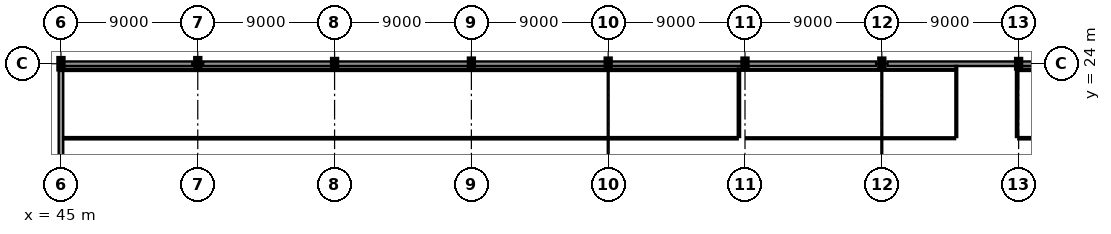
"""IFC4 building model, lengths in metres.
Left out: names, types, materials, properties, quantities, classifications, styles, units other than length and angle.
Written with IfcOpenShell. Run it as: python <this file> out.ifc"""

import sys

from ifc_helpers import new_model, si_unit, direction, frame, frame_2d, origin, origin_2d, place, context, subcontext, project, spatial, rectangle, i_section, extrude, element, fill, save


model = new_model("IFC4")
c1 = context("Model", 3, precision=1e-05, world=origin(), true_north=direction((0.0, 1.0)))
c2 = subcontext(c1, "Body", "Model", "MODEL_VIEW")
j1 = project(units=[si_unit("LENGTHUNIT", "METRE"), si_unit("PLANEANGLEUNIT", "RADIAN")], contexts=[c1])
p1 = place(None, origin())
s1 = spatial("IfcSite", under=j1, at=p1, CompositionType="ELEMENT")
p2 = place(p1, origin())
s2 = spatial("IfcBuilding", under=s1, at=p2, CompositionType="ELEMENT")
p3 = place(p2, frame((0.0, 0.0, 18.9)))
s3 = spatial("IfcBuildingStorey", under=s2, at=p3, CompositionType="ELEMENT", Elevation=18.9)
for number, where, z_axis, x_axis in (
    (1, (45.0, 24.0, 0.0), (0.0, 0.0, 1.0), (1.0, 0.0, 0.0)),
    (2, (54.0, 24.0, 0.0), (0.0, 0.0, 1.0), (0.0, 1.0, 0.0)),
):
    element("IfcColumn", number, at=place(p3, frame(where, z_axis=z_axis, x_axis=x_axis)), inside=s3, PredefinedType="COLUMN", context=c2, shape_type="SweptSolid", body=[
        extrude(i_section(OverallWidth=0.304, OverallDepth=0.716, WebThickness=0.021, FlangeThickness=0.04, at=origin_2d()), origin(), (0.0, 0.0, 1.0), 4.5),
    ])
p4 = place(p3, frame((63.0, 24.0, 0.0), z_axis=(0.0, 0.0, 1.0), x_axis=(1.0, 0.0, 0.0)))
e3 = element("IfcColumn", 3, at=p4, inside=s3, PredefinedType="COLUMN", context=c2, shape_type="SweptSolid", body=[
    extrude(i_section(OverallWidth=0.3, OverallDepth=0.6, WebThickness=0.015, FlangeThickness=0.03, at=origin_2d()), origin(), (0.0, 0.0, 1.0), 4.5),
])
for number, where, z_axis, x_axis in (
    (4, (72.0, 24.0, 0.0), (0.0, 0.0, 1.0), (1.0, 0.0, 0.0)),
    (5, (81.0, 24.0, 0.0), (0.0, 0.0, 1.0), (1.0, 0.0, 0.0)),
    (6, (90.0, 24.0, 0.0), (0.0, 0.0, 1.0), (1.0, 0.0, 0.0)),
    (7, (99.0, 24.0, 0.0), (0.0, 0.0, 1.0), (0.0, 1.0, 0.0)),
):
    element("IfcColumn", number, at=place(p3, frame(where, z_axis=z_axis, x_axis=x_axis)), inside=s3, PredefinedType="COLUMN", context=c2, shape_type="SweptSolid", body=[
        extrude(i_section(OverallWidth=0.3, OverallDepth=0.65, WebThickness=0.016, FlangeThickness=0.031, at=origin_2d()), origin(), (0.0, 0.0, 1.0), 4.5),
    ])
p5 = place(p3, frame((108.0, 24.0, 0.0), z_axis=(0.0, 0.0, 1.0), x_axis=(1.0, 0.0, 0.0)))
e8 = element("IfcColumn", 8, at=p5, inside=s3, PredefinedType="COLUMN", context=c2, shape_type="SweptSolid", body=[
    extrude(i_section(OverallWidth=0.3, OverallDepth=0.6, WebThickness=0.015, FlangeThickness=0.03, at=origin_2d()), origin(), (0.0, 0.0, 1.0), 4.5),
])
p6 = place(p3, frame((80.942, 24.0, 0.0), z_axis=(0.0, 0.0, 1.0), x_axis=(-1.0, 0.0, 0.0)))
e9 = element("IfcWall", 9, at=p6, inside=s3, PredefinedType="SOLIDWALL", context=c2, shape_type="SweptSolid", body=[
    extrude(rectangle(XDim=8.934, YDim=0.3, at=frame_2d((4.467, 0.0))), origin(), (0.0, 0.0, 1.0), 3.345),
])
p7 = place(p6, frame((1.502, 0.0, 0.85)))
e10 = element("IfcOpeningElement", 10, at=p7, cuts=e9, PredefinedType="OPENING", context=c2, shape_type="SweptSolid", body=[
    extrude(rectangle(XDim=2.0, YDim=2.0, at=frame_2d((1.0, 1.0))), frame((0.0, 0.165, 0.0), z_axis=(0.0, -1.0, 0.0), x_axis=(1.0, 0.0, 0.0)), (0.0, 0.0, 1.0), 0.33),
])
p8 = place(p6, frame((5.432, 0.0, 0.85)))
e11 = element("IfcOpeningElement", 11, at=p8, cuts=e9, PredefinedType="OPENING", context=c2, shape_type="SweptSolid", body=[
    extrude(rectangle(XDim=2.0, YDim=2.0, at=frame_2d((1.0, 1.0))), frame((0.0, 0.165, 0.0), z_axis=(0.0, -1.0, 0.0), x_axis=(1.0, 0.0, 0.0)), (0.0, 0.0, 1.0), 0.33),
])
p9 = place(p3, frame((71.992, 24.0, 0.0), z_axis=(0.0, 0.0, 1.0), x_axis=(-1.0, 0.0, 0.0)))
e12 = element("IfcWall", 12, at=p9, inside=s3, PredefinedType="SOLIDWALL", context=c2, shape_type="SweptSolid", body=[
    extrude(rectangle(XDim=8.984, YDim=0.3, at=frame_2d((4.492, 0.0))), origin(), (0.0, 0.0, 1.0), 3.345),
])
p10 = place(p9, frame((1.516, 0.0, 0.85)))
e13 = element("IfcOpeningElement", 13, at=p10, cuts=e12, PredefinedType="OPENING", context=c2, shape_type="SweptSolid", body=[
    extrude(rectangle(XDim=2.0, YDim=2.0, at=frame_2d((1.0, 1.0))), frame((0.0, 0.165, 0.0), z_axis=(0.0, -1.0, 0.0), x_axis=(1.0, 0.0, 0.0)), (0.0, 0.0, 1.0), 0.33),
])
p11 = place(p9, frame((5.468, 0.0, 0.85)))
e14 = element("IfcOpeningElement", 14, at=p11, cuts=e12, PredefinedType="OPENING", context=c2, shape_type="SweptSolid", body=[
    extrude(rectangle(XDim=2.0, YDim=2.0, at=frame_2d((1.0, 1.0))), frame((0.0, 0.165, 0.0), z_axis=(0.0, -1.0, 0.0), x_axis=(1.0, 0.0, 0.0)), (0.0, 0.0, 1.0), 0.33),
])
p12 = place(p3, frame((62.992, 24.0, 0.0), z_axis=(0.0, 0.0, 1.0), x_axis=(-1.0, 0.0, 0.0)))
e15 = element("IfcWall", 15, at=p12, inside=s3, PredefinedType="SOLIDWALL", context=c2, shape_type="SweptSolid", body=[
    extrude(rectangle(XDim=8.636, YDim=0.3, at=frame_2d((4.318, 0.0))), origin(), (0.0, 0.0, 1.0), 3.345),
])
p13 = place(p12, frame((1.418, 0.0, 0.85)))
e16 = element("IfcOpeningElement", 16, at=p13, cuts=e15, PredefinedType="OPENING", context=c2, shape_type="SweptSolid", body=[
    extrude(rectangle(XDim=2.0, YDim=2.0, at=frame_2d((1.0, 1.0))), frame((0.0, 0.165, 0.0), z_axis=(0.0, -1.0, 0.0), x_axis=(1.0, 0.0, 0.0)), (0.0, 0.0, 1.0), 0.33),
])
p14 = place(p12, frame((5.218, 0.0, 0.85)))
e17 = element("IfcOpeningElement", 17, at=p14, cuts=e15, PredefinedType="OPENING", context=c2, shape_type="SweptSolid", body=[
    extrude(rectangle(XDim=2.0, YDim=2.0, at=frame_2d((1.0, 1.0))), frame((0.0, 0.165, 0.0), z_axis=(0.0, -1.0, 0.0), x_axis=(1.0, 0.0, 0.0)), (0.0, 0.0, 1.0), 0.33),
])
p15 = place(p3, frame((53.644, 24.0, 0.0), z_axis=(0.0, 0.0, 1.0), x_axis=(-1.0, 0.0, 0.0)))
e18 = element("IfcWall", 18, at=p15, inside=s3, PredefinedType="SOLIDWALL", context=c2, shape_type="SweptSolid", body=[
    extrude(rectangle(XDim=8.636, YDim=0.3, at=frame_2d((4.318, 0.0))), origin(), (0.0, 0.0, 1.0), 3.345),
])
p16 = place(p15, frame((1.418, 0.0, 0.85)))
e19 = element("IfcOpeningElement", 19, at=p16, cuts=e18, PredefinedType="OPENING", context=c2, shape_type="SweptSolid", body=[
    extrude(rectangle(XDim=2.0, YDim=2.0, at=frame_2d((1.0, 1.0))), frame((0.0, 0.165, 0.0), z_axis=(0.0, -1.0, 0.0), x_axis=(1.0, 0.0, 0.0)), (0.0, 0.0, 1.0), 0.33),
])
p17 = place(p15, frame((5.218, 0.0, 0.85)))
e20 = element("IfcOpeningElement", 20, at=p17, cuts=e18, PredefinedType="OPENING", context=c2, shape_type="SweptSolid", body=[
    extrude(rectangle(XDim=2.0, YDim=2.0, at=frame_2d((1.0, 1.0))), frame((0.0, 0.165, 0.0), z_axis=(0.0, -1.0, 0.0), x_axis=(1.0, 0.0, 0.0)), (0.0, 0.0, 1.0), 0.33),
])
p18 = place(p3, frame((45.0, 23.644, 0.0), z_axis=(0.0, 0.0, 1.0), x_axis=(0.0, -1.0, 0.0)))
e21 = element("IfcWall", 21, at=p18, inside=s3, PredefinedType="SOLIDWALL", context=c2, shape_type="SweptSolid", body=[
    extrude(rectangle(XDim=11.336, YDim=0.3, at=frame_2d((5.668, 0.0))), origin(), (0.0, 0.0, 1.0), 3.705),
])
p19 = place(p18, frame((2.174, 0.0, 0.85)))
e22 = element("IfcOpeningElement", 22, at=p19, cuts=e21, PredefinedType="OPENING", context=c2, shape_type="SweptSolid", body=[
    extrude(rectangle(XDim=2.0, YDim=2.0, at=frame_2d((1.0, 1.0))), frame((0.0, 0.165, 0.0), z_axis=(0.0, -1.0, 0.0), x_axis=(1.0, 0.0, 0.0)), (0.0, 0.0, 1.0), 0.33),
])
p20 = place(p18, frame((5.604, 0.0, 0.85)))
e23 = element("IfcOpeningElement", 23, at=p20, cuts=e21, PredefinedType="OPENING", context=c2, shape_type="SweptSolid", body=[
    extrude(rectangle(XDim=2.0, YDim=2.0, at=frame_2d((1.0, 1.0))), frame((0.0, 0.165, 0.0), z_axis=(0.0, -1.0, 0.0), x_axis=(1.0, 0.0, 0.0)), (0.0, 0.0, 1.0), 0.33),
])
p21 = place(p3, frame((98.627, 24.0, 0.0), z_axis=(0.0, 0.0, 1.0), x_axis=(-1.0, 0.0, 0.0)))
e24 = element("IfcWall", 24, at=p21, inside=s3, PredefinedType="SOLIDWALL", context=c2, shape_type="SweptSolid", body=[
    extrude(rectangle(XDim=8.619, YDim=0.3, at=frame_2d((4.31, 0.0))), origin(), (0.0, 0.0, 1.0), 3.345),
])
p22 = place(p21, frame((1.413, 0.0, 0.85)))
e25 = element("IfcOpeningElement", 25, at=p22, cuts=e24, PredefinedType="OPENING", context=c2, shape_type="SweptSolid", body=[
    extrude(rectangle(XDim=2.0, YDim=2.0, at=frame_2d((1.0, 1.0))), frame((0.0, 0.165, 0.0), z_axis=(0.0, -1.0, 0.0), x_axis=(1.0, 0.0, 0.0)), (0.0, 0.0, 1.0), 0.33),
])
p23 = place(p21, frame((5.206, 0.0, 0.85)))
e26 = element("IfcOpeningElement", 26, at=p23, cuts=e24, PredefinedType="OPENING", context=c2, shape_type="SweptSolid", body=[
    extrude(rectangle(XDim=2.0, YDim=2.0, at=frame_2d((1.0, 1.0))), frame((0.0, 0.165, 0.0), z_axis=(0.0, -1.0, 0.0), x_axis=(1.0, 0.0, 0.0)), (0.0, 0.0, 1.0), 0.33),
])
p24 = place(p3, frame((89.992, 24.0, 0.0), z_axis=(0.0, 0.0, 1.0), x_axis=(-1.0, 0.0, 0.0)))
e27 = element("IfcWall", 27, at=p24, inside=s3, PredefinedType="SOLIDWALL", context=c2, shape_type="SweptSolid", body=[
    extrude(rectangle(XDim=8.934, YDim=0.3, at=frame_2d((4.467, 0.0))), origin(), (0.0, 0.0, 1.0), 3.345),
])
p25 = place(p24, frame((1.502, 0.0, 0.85)))
e28 = element("IfcOpeningElement", 28, at=p25, cuts=e27, PredefinedType="OPENING", context=c2, shape_type="SweptSolid", body=[
    extrude(rectangle(XDim=2.0, YDim=2.0, at=frame_2d((1.0, 1.0))), frame((0.0, 0.165, 0.0), z_axis=(0.0, -1.0, 0.0), x_axis=(1.0, 0.0, 0.0)), (0.0, 0.0, 1.0), 0.33),
])
p26 = place(p24, frame((5.432, 0.0, 0.85)))
e29 = element("IfcOpeningElement", 29, at=p26, cuts=e27, PredefinedType="OPENING", context=c2, shape_type="SweptSolid", body=[
    extrude(rectangle(XDim=2.0, YDim=2.0, at=frame_2d((1.0, 1.0))), frame((0.0, 0.165, 0.0), z_axis=(0.0, -1.0, 0.0), x_axis=(1.0, 0.0, 0.0)), (0.0, 0.0, 1.0), 0.33),
])
p27 = place(p3, frame((116.992, 24.0, 0.0), z_axis=(0.0, 0.0, 1.0), x_axis=(-1.0, 0.0, 0.0)))
e30 = element("IfcWall", 30, at=p27, inside=s3, PredefinedType="SOLIDWALL", context=c2, shape_type="SweptSolid", body=[
    extrude(rectangle(XDim=8.984, YDim=0.3, at=frame_2d((4.492, 0.0))), origin(), (0.0, 0.0, 1.0), 3.247),
])
p28 = place(p27, frame((1.516, 0.0, 0.85)))
e31 = element("IfcOpeningElement", 31, at=p28, cuts=e30, PredefinedType="OPENING", context=c2, shape_type="SweptSolid", body=[
    extrude(rectangle(XDim=2.0, YDim=2.0, at=frame_2d((1.0, 1.0))), frame((0.0, 0.165, 0.0), z_axis=(0.0, -1.0, 0.0), x_axis=(1.0, 0.0, 0.0)), (0.0, 0.0, 1.0), 0.33),
])
p29 = place(p27, frame((5.468, 0.0, 0.85)))
e32 = element("IfcOpeningElement", 32, at=p29, cuts=e30, PredefinedType="OPENING", context=c2, shape_type="SweptSolid", body=[
    extrude(rectangle(XDim=2.0, YDim=2.0, at=frame_2d((1.0, 1.0))), frame((0.0, 0.165, 0.0), z_axis=(0.0, -1.0, 0.0), x_axis=(1.0, 0.0, 0.0)), (0.0, 0.0, 1.0), 0.33),
])
p30 = place(p3, frame((107.992, 24.0, 0.0), z_axis=(0.0, 0.0, 1.0), x_axis=(-1.0, 0.0, 0.0)))
e33 = element("IfcWall", 33, at=p30, inside=s3, PredefinedType="SOLIDWALL", context=c2, shape_type="SweptSolid", body=[
    extrude(rectangle(XDim=8.619, YDim=0.3, at=frame_2d((4.31, 0.0))), origin(), (0.0, 0.0, 1.0), 3.345),
])
p31 = place(p30, frame((1.413, 0.0, 0.85)))
e34 = element("IfcOpeningElement", 34, at=p31, cuts=e33, PredefinedType="OPENING", context=c2, shape_type="SweptSolid", body=[
    extrude(rectangle(XDim=2.0, YDim=2.0, at=frame_2d((1.0, 1.0))), frame((0.0, 0.165, 0.0), z_axis=(0.0, -1.0, 0.0), x_axis=(1.0, 0.0, 0.0)), (0.0, 0.0, 1.0), 0.33),
])
p32 = place(p30, frame((5.206, 0.0, 0.85)))
e35 = element("IfcOpeningElement", 35, at=p32, cuts=e33, PredefinedType="OPENING", context=c2, shape_type="SweptSolid", body=[
    extrude(rectangle(XDim=2.0, YDim=2.0, at=frame_2d((1.0, 1.0))), frame((0.0, 0.165, 0.0), z_axis=(0.0, -1.0, 0.0), x_axis=(1.0, 0.0, 0.0)), (0.0, 0.0, 1.0), 0.33),
])
p33 = place(p3, frame((89.52, 19.1, 0.0), z_axis=(0.0, 0.0, 1.0), x_axis=(-1.0, 0.0, 0.0)))
e36 = element("IfcWall", 36, at=p33, inside=s3, PredefinedType="PARTITIONING", context=c2, shape_type="SweptSolid", body=[
    extrude(rectangle(XDim=44.375, YDim=0.15, at=frame_2d((22.188, 0.0))), origin(), (0.0, 0.0, 1.0), 4.14),
])
p34 = place(p33, frame((21.663, 0.0, 0.0)))
e37 = element("IfcOpeningElement", 37, at=p34, cuts=e36, PredefinedType="OPENING", context=c2, shape_type="SweptSolid", body=[
    extrude(rectangle(XDim=1.05, YDim=2.25, at=frame_2d((0.525, 1.125))), frame((0.0, 0.09, 0.0), z_axis=(0.0, -1.0, 0.0), x_axis=(1.0, 0.0, 0.0)), (0.0, 0.0, 1.0), 0.18),
])
p35 = place(p3, frame((45.008, 23.6, 0.0), z_axis=(0.0, 0.0, 1.0), x_axis=(1.0, 0.0, 0.0)))
e38 = element("IfcWall", 38, at=p35, inside=s3, PredefinedType="PARTITIONING", context=c2, shape_type="SweptSolid", body=[
    extrude(rectangle(XDim=44.512, YDim=0.15, at=frame_2d((22.256, 0.0))), origin(), (0.0, 0.0, 1.0), 4.14),
])
p36 = place(p3, frame((89.6, 23.677, 0.0), z_axis=(0.0, 0.0, 1.0), x_axis=(0.0, -1.0, 0.0)))
e39 = element("IfcWall", 39, at=p36, inside=s3, PredefinedType="PARTITIONING", context=c2, shape_type="SweptSolid", body=[
    extrude(rectangle(XDim=4.497, YDim=0.15, at=frame_2d((2.249, 0.0))), origin(), (0.0, 0.0, 1.0), 4.14),
])
p37 = place(p3, frame((89.608, 23.6, 0.0), z_axis=(0.0, 0.0, 1.0), x_axis=(1.0, 0.0, 0.0)))
e40 = element("IfcWall", 40, at=p37, inside=s3, PredefinedType="PARTITIONING", context=c2, shape_type="SweptSolid", body=[
    extrude(rectangle(XDim=14.212, YDim=0.12, at=frame_2d((7.106, 0.0))), origin(), (0.0, 0.0, 1.0), 4.14),
])
p38 = place(p3, frame((103.9, 23.855, 0.0), z_axis=(0.0, 0.0, 1.0), x_axis=(0.0, -1.0, 0.0)))
e41 = element("IfcWall", 41, at=p38, inside=s3, PredefinedType="PARTITIONING", context=c2, shape_type="SweptSolid", body=[
    extrude(rectangle(XDim=4.675, YDim=0.12, at=frame_2d((2.337, 0.0))), origin(), (0.0, 0.0, 1.0), 4.14),
])
p39 = place(p3, frame((103.82, 19.1, 0.0), z_axis=(0.0, 0.0, 1.0), x_axis=(-1.0, 0.0, 0.0)))
e42 = element("IfcWall", 42, at=p39, inside=s3, PredefinedType="PARTITIONING", context=c2, shape_type="SweptSolid", body=[
    extrude(rectangle(XDim=13.74, YDim=0.12, at=frame_2d((6.87, 0.0))), origin(), (0.0, 0.0, 1.0), 4.14),
])
p40 = place(p39, frame((6.395, 0.0, 0.0)))
e43 = element("IfcOpeningElement", 43, at=p40, cuts=e42, PredefinedType="OPENING", context=c2, shape_type="SweptSolid", body=[
    extrude(rectangle(XDim=0.95, YDim=2.15, at=frame_2d((0.475, 1.075))), frame((0.0, 0.075, 0.0), z_axis=(0.0, -1.0, 0.0), x_axis=(1.0, 0.0, 0.0)), (0.0, 0.0, 1.0), 0.15),
])
p41 = place(p3, frame((147.455, 19.1, 0.0), z_axis=(0.0, 0.0, 1.0), x_axis=(-1.0, 0.0, 0.0)))
e44 = element("IfcWall", 44, at=p41, inside=s3, PredefinedType="PARTITIONING", context=c2, shape_type="SweptSolid", body=[
    extrude(rectangle(XDim=39.475, YDim=0.15, at=frame_2d((19.738, 0.0))), origin(), (0.0, 0.0, 1.0), 4.14),
])
p42 = place(p41, frame((19.213, 0.0, 0.0)))
e45 = element("IfcOpeningElement", 45, at=p42, cuts=e44, PredefinedType="OPENING", context=c2, shape_type="SweptSolid", body=[
    extrude(rectangle(XDim=1.05, YDim=2.25, at=frame_2d((0.525, 1.125))), frame((0.0, 0.09, 0.0), z_axis=(0.0, -1.0, 0.0), x_axis=(1.0, 0.0, 0.0)), (0.0, 0.0, 1.0), 0.18),
])
p43 = place(p3, frame((107.9, 19.18, 0.0), z_axis=(0.0, 0.0, 1.0), x_axis=(0.0, 1.0, 0.0)))
e46 = element("IfcWall", 46, at=p43, inside=s3, PredefinedType="PARTITIONING", context=c2, shape_type="SweptSolid", body=[
    extrude(rectangle(XDim=4.522, YDim=0.15, at=frame_2d((2.261, 0.0))), origin(), (0.0, 0.0, 1.0), 3.655),
])
p44 = place(p3, frame((107.908, 23.6, 0.0), z_axis=(0.0, 0.0, 1.0), x_axis=(1.0, 0.0, 0.0)))
e47 = element("IfcWall", 47, at=p44, inside=s3, PredefinedType="PARTITIONING", context=c2, shape_type="SweptSolid", body=[
    extrude(rectangle(XDim=39.122, YDim=0.15, at=frame_2d((19.561, 0.0))), origin(), (0.0, 0.0, 1.0), 4.14),
])
p45 = place(p7, origin())
e48 = element("IfcWindow", 48, at=p45, inside=s3, PartitioningType="SINGLE_PANEL", PredefinedType="WINDOW", context=c2, shape_type="SweptSolid", body=[
    extrude(rectangle(XDim=2.0, YDim=2.0, at=frame_2d((1.0, 1.0))), frame((0.0, 0.03, 0.0), z_axis=(0.0, -1.0, 0.0), x_axis=(1.0, 0.0, 0.0)), (0.0, 0.0, 1.0), 0.06),
])
fill(e10, e48)
p46 = place(p8, origin())
e49 = element("IfcWindow", 49, at=p46, inside=s3, PartitioningType="SINGLE_PANEL", PredefinedType="WINDOW", context=c2, shape_type="SweptSolid", body=[
    extrude(rectangle(XDim=2.0, YDim=2.0, at=frame_2d((1.0, 1.0))), frame((0.0, 0.03, 0.0), z_axis=(0.0, -1.0, 0.0), x_axis=(1.0, 0.0, 0.0)), (0.0, 0.0, 1.0), 0.06),
])
fill(e11, e49)
p47 = place(p10, origin())
e50 = element("IfcWindow", 50, at=p47, inside=s3, PartitioningType="SINGLE_PANEL", PredefinedType="WINDOW", context=c2, shape_type="SweptSolid", body=[
    extrude(rectangle(XDim=2.0, YDim=2.0, at=frame_2d((1.0, 1.0))), frame((0.0, 0.03, 0.0), z_axis=(0.0, -1.0, 0.0), x_axis=(1.0, 0.0, 0.0)), (0.0, 0.0, 1.0), 0.06),
])
fill(e13, e50)
p48 = place(p11, origin())
e51 = element("IfcWindow", 51, at=p48, inside=s3, PartitioningType="SINGLE_PANEL", PredefinedType="WINDOW", context=c2, shape_type="SweptSolid", body=[
    extrude(rectangle(XDim=2.0, YDim=2.0, at=frame_2d((1.0, 1.0))), frame((0.0, 0.03, 0.0), z_axis=(0.0, -1.0, 0.0), x_axis=(1.0, 0.0, 0.0)), (0.0, 0.0, 1.0), 0.06),
])
fill(e14, e51)
p49 = place(p13, origin())
e52 = element("IfcWindow", 52, at=p49, inside=s3, PartitioningType="SINGLE_PANEL", PredefinedType="WINDOW", context=c2, shape_type="SweptSolid", body=[
    extrude(rectangle(XDim=2.0, YDim=2.0, at=frame_2d((1.0, 1.0))), frame((0.0, 0.03, 0.0), z_axis=(0.0, -1.0, 0.0), x_axis=(1.0, 0.0, 0.0)), (0.0, 0.0, 1.0), 0.06),
])
fill(e16, e52)
p50 = place(p14, origin())
e53 = element("IfcWindow", 53, at=p50, inside=s3, PartitioningType="SINGLE_PANEL", PredefinedType="WINDOW", context=c2, shape_type="SweptSolid", body=[
    extrude(rectangle(XDim=2.0, YDim=2.0, at=frame_2d((1.0, 1.0))), frame((0.0, 0.03, 0.0), z_axis=(0.0, -1.0, 0.0), x_axis=(1.0, 0.0, 0.0)), (0.0, 0.0, 1.0), 0.06),
])
fill(e17, e53)
p51 = place(p16, origin())
e54 = element("IfcWindow", 54, at=p51, inside=s3, PartitioningType="SINGLE_PANEL", PredefinedType="WINDOW", context=c2, shape_type="SweptSolid", body=[
    extrude(rectangle(XDim=2.0, YDim=2.0, at=frame_2d((1.0, 1.0))), frame((0.0, 0.03, 0.0), z_axis=(0.0, -1.0, 0.0), x_axis=(1.0, 0.0, 0.0)), (0.0, 0.0, 1.0), 0.06),
])
fill(e19, e54)
p52 = place(p17, origin())
e55 = element("IfcWindow", 55, at=p52, inside=s3, PartitioningType="SINGLE_PANEL", PredefinedType="WINDOW", context=c2, shape_type="SweptSolid", body=[
    extrude(rectangle(XDim=2.0, YDim=2.0, at=frame_2d((1.0, 1.0))), frame((0.0, 0.03, 0.0), z_axis=(0.0, -1.0, 0.0), x_axis=(1.0, 0.0, 0.0)), (0.0, 0.0, 1.0), 0.06),
])
fill(e20, e55)
p53 = place(p19, origin())
e56 = element("IfcWindow", 56, at=p53, inside=s3, PartitioningType="SINGLE_PANEL", PredefinedType="WINDOW", context=c2, shape_type="SweptSolid", body=[
    extrude(rectangle(XDim=2.0, YDim=2.0, at=frame_2d((1.0, 1.0))), frame((0.0, 0.03, 0.0), z_axis=(0.0, -1.0, 0.0), x_axis=(1.0, 0.0, 0.0)), (0.0, 0.0, 1.0), 0.06),
])
fill(e22, e56)
p54 = place(p22, origin())
e57 = element("IfcWindow", 57, at=p54, inside=s3, PartitioningType="SINGLE_PANEL", PredefinedType="WINDOW", context=c2, shape_type="SweptSolid", body=[
    extrude(rectangle(XDim=2.0, YDim=2.0, at=frame_2d((1.0, 1.0))), frame((0.0, 0.03, 0.0), z_axis=(0.0, -1.0, 0.0), x_axis=(1.0, 0.0, 0.0)), (0.0, 0.0, 1.0), 0.06),
])
fill(e25, e57)
p55 = place(p23, origin())
e58 = element("IfcWindow", 58, at=p55, inside=s3, PartitioningType="SINGLE_PANEL", PredefinedType="WINDOW", context=c2, shape_type="SweptSolid", body=[
    extrude(rectangle(XDim=2.0, YDim=2.0, at=frame_2d((1.0, 1.0))), frame((0.0, 0.03, 0.0), z_axis=(0.0, -1.0, 0.0), x_axis=(1.0, 0.0, 0.0)), (0.0, 0.0, 1.0), 0.06),
])
fill(e26, e58)
p56 = place(p25, origin())
e59 = element("IfcWindow", 59, at=p56, inside=s3, PartitioningType="SINGLE_PANEL", PredefinedType="WINDOW", context=c2, shape_type="SweptSolid", body=[
    extrude(rectangle(XDim=2.0, YDim=2.0, at=frame_2d((1.0, 1.0))), frame((0.0, 0.03, 0.0), z_axis=(0.0, -1.0, 0.0), x_axis=(1.0, 0.0, 0.0)), (0.0, 0.0, 1.0), 0.06),
])
fill(e28, e59)
p57 = place(p26, origin())
e60 = element("IfcWindow", 60, at=p57, inside=s3, PartitioningType="SINGLE_PANEL", PredefinedType="WINDOW", context=c2, shape_type="SweptSolid", body=[
    extrude(rectangle(XDim=2.0, YDim=2.0, at=frame_2d((1.0, 1.0))), frame((0.0, 0.03, 0.0), z_axis=(0.0, -1.0, 0.0), x_axis=(1.0, 0.0, 0.0)), (0.0, 0.0, 1.0), 0.06),
])
fill(e29, e60)
p58 = place(p31, origin())
e61 = element("IfcWindow", 61, at=p58, inside=s3, PartitioningType="SINGLE_PANEL", PredefinedType="WINDOW", context=c2, shape_type="SweptSolid", body=[
    extrude(rectangle(XDim=2.0, YDim=2.0, at=frame_2d((1.0, 1.0))), frame((0.0, 0.03, 0.0), z_axis=(0.0, -1.0, 0.0), x_axis=(1.0, 0.0, 0.0)), (0.0, 0.0, 1.0), 0.06),
])
fill(e34, e61)
p59 = place(p32, origin())
e62 = element("IfcWindow", 62, at=p59, inside=s3, PartitioningType="SINGLE_PANEL", PredefinedType="WINDOW", context=c2, shape_type="SweptSolid", body=[
    extrude(rectangle(XDim=2.0, YDim=2.0, at=frame_2d((1.0, 1.0))), frame((0.0, 0.03, 0.0), z_axis=(0.0, -1.0, 0.0), x_axis=(1.0, 0.0, 0.0)), (0.0, 0.0, 1.0), 0.06),
])
fill(e35, e62)
p60 = place(p34, frame((1.05, 0.0, 0.0), z_axis=(0.0, 0.0, 1.0), x_axis=(-1.0, 0.0, 0.0)))
e63 = element("IfcDoor", 63, at=p60, inside=s3, OperationType="SINGLE_SWING_RIGHT", PredefinedType="DOOR", context=c2, shape_type="SweptSolid", body=[
    extrude(rectangle(XDim=1.05, YDim=2.25, at=frame_2d((0.525, 1.125))), frame((0.0, 0.025, 0.0), z_axis=(0.0, -1.0, 0.0), x_axis=(1.0, 0.0, 0.0)), (0.0, 0.0, 1.0), 0.05),
])
fill(e37, e63)
p61 = place(p40, origin())
e64 = element("IfcDoor", 64, at=p61, inside=s3, OperationType="SINGLE_SWING_LEFT", PredefinedType="DOOR", context=c2, shape_type="SweptSolid", body=[
    extrude(rectangle(XDim=0.95, YDim=2.15, at=frame_2d((0.475, 1.075))), frame((0.0, 0.025, 0.0), z_axis=(0.0, -1.0, 0.0), x_axis=(1.0, 0.0, 0.0)), (0.0, 0.0, 1.0), 0.05),
])
fill(e43, e64)
save(model, sys.argv[1])
